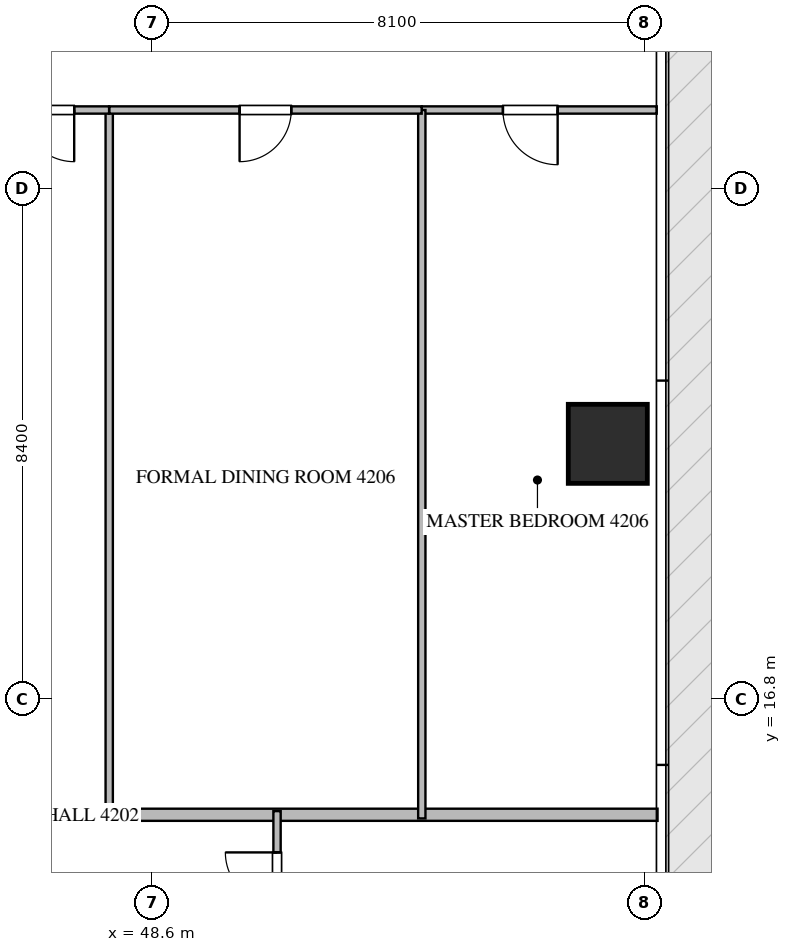
"""IFC4 building model, lengths in metres.
Left out: names, types, materials, properties, quantities, classifications, styles, units other than length and angle.
Written with IfcOpenShell. Run it as: python <this file> out.ifc"""

import sys

from ifc_helpers import new_model, si_unit, direction, frame, frame_2d, origin, origin_2d, place, context, subcontext, project, spatial, rectangle, extrude, source, transform, mapped, element, fill, save


model = new_model("IFC4")
c1 = context("Model", 3, precision=1e-05, world=origin(), true_north=direction((0.0, 1.0)))
c2 = subcontext(c1, "Body", "Model", "MODEL_VIEW")
j1 = project(units=[si_unit("LENGTHUNIT", "METRE"), si_unit("PLANEANGLEUNIT", "RADIAN")], contexts=[c1])
p1 = place(None, origin())
s1 = spatial("IfcSite", under=j1, at=p1, CompositionType="ELEMENT")
p2 = place(p1, origin())
s2 = spatial("IfcBuilding", under=s1, at=p2, CompositionType="ELEMENT")
p3 = place(p2, frame((0.0, 0.0, 168.9)))
s3 = spatial("IfcBuildingStorey", under=s2, at=p3, CompositionType="ELEMENT", Elevation=168.9)
m1 = source(origin(), c2, "Body", "SweptSolid", [
    extrude(rectangle(XDim=1.3, YDim=1.3, at=origin_2d()), origin(), (0.0, 0.0, 1.0), 3.75),
])
p4 = place(p3, frame((56.1, 21.0, -0.26), z_axis=(0.0, 0.0, 1.0), x_axis=(1.0, 0.0, 0.0)))
e1 = element("IfcColumn", 1, at=p4, inside=s3, PredefinedType="COLUMN", context=c2, shape_type="MappedRepresentation", body=[
    mapped(m1, transform((0.0, 0.0, 0.0), scale=1.0)),
])
p5 = place(p3, frame((43.85, 14.9, 0.0), z_axis=(0.0, 0.0, 1.0), x_axis=(1.0, 0.0, 0.0)))
e2 = element("IfcWall", 2, at=p5, inside=s3, PredefinedType="PARTITIONING", context=c2, shape_type="SweptSolid", body=[
    extrude(rectangle(XDim=13.068, YDim=0.2, at=frame_2d((6.534, 0.0))), origin(), (0.0, 0.0, 1.0), 3.49),
])
p6 = place(p3, frame((50.66, 12.752, 0.0), z_axis=(0.0, 0.0, 1.0), x_axis=(0.0, 1.0, 0.0)))
e3 = element("IfcWall", 3, at=p6, inside=s3, PredefinedType="PARTITIONING", context=c2, shape_type="SweptSolid", body=[
    extrude(rectangle(XDim=2.208, YDim=0.12, at=frame_2d((1.104, 0.0))), origin(), (0.0, 0.0, 1.0), 3.49),
])
p7 = place(p6, frame((0.679, 0.0, 0.0)))
e4 = element("IfcOpeningElement", 4, at=p7, cuts=e3, PredefinedType="OPENING", context=c2, shape_type="SweptSolid", body=[
    extrude(rectangle(XDim=0.85, YDim=2.1, at=frame_2d((0.425, 1.05))), frame((0.0, 0.07, 0.0), z_axis=(0.0, -1.0, 0.0), x_axis=(1.0, 0.0, 0.0)), (0.0, 0.0, 1.0), 0.14),
])
p8 = place(p3, frame((56.905, 26.49, 0.0), z_axis=(0.0, 0.0, 1.0), x_axis=(-1.0, 0.0, 0.0)))
e5 = element("IfcWall", 5, at=p8, inside=s3, PredefinedType="PARTITIONING", context=c2, shape_type="SweptSolid", body=[
    extrude(rectangle(XDim=3.864, YDim=0.12, at=frame_2d((1.932, 0.0))), origin(), (0.0, 0.0, 1.0), 3.49),
])
p9 = place(p8, frame((1.63, 0.0, 0.0)))
e6 = element("IfcOpeningElement", 6, at=p9, cuts=e5, PredefinedType="OPENING", context=c2, shape_type="SweptSolid", body=[
    extrude(rectangle(XDim=0.9, YDim=2.1, at=frame_2d((0.45, 1.05))), frame((0.0, 0.07, 0.0), z_axis=(0.0, -1.0, 0.0), x_axis=(1.0, 0.0, 0.0)), (0.0, 0.0, 1.0), 0.14),
])
p10 = place(p3, frame((53.041, 14.84, 0.0), z_axis=(0.0, 0.0, 1.0), x_axis=(0.0, 1.0, 0.0)))
e7 = element("IfcWall", 7, at=p10, inside=s3, PredefinedType="PARTITIONING", context=c2, shape_type="SweptSolid", body=[
    extrude(rectangle(XDim=11.65, YDim=0.12, at=frame_2d((5.825, 0.0))), origin(), (0.0, 0.0, 1.0), 3.49),
])
p11 = place(p3, frame((47.9, 14.84, 0.0), z_axis=(0.0, 0.0, 1.0), x_axis=(0.0, 1.0, 0.0)))
e8 = element("IfcWall", 8, at=p11, inside=s3, PredefinedType="PARTITIONING", context=c2, shape_type="SweptSolid", body=[
    extrude(rectangle(XDim=11.65, YDim=0.12, at=frame_2d((5.825, 0.0))), origin(), (0.0, 0.0, 1.0), 2.972),
])
p12 = place(p3, frame((53.039, 26.49, 0.0), z_axis=(0.0, 0.0, 1.0), x_axis=(-1.0, 0.0, 0.0)))
e9 = element("IfcWall", 9, at=p12, inside=s3, PredefinedType="PARTITIONING", context=c2, shape_type="SweptSolid", body=[
    extrude(rectangle(XDim=5.139, YDim=0.12, at=frame_2d((2.57, 0.0))), origin(), (0.0, 0.0, 1.0), 3.49),
])
p13 = place(p12, frame((2.145, 0.0, 0.0)))
e10 = element("IfcOpeningElement", 10, at=p13, cuts=e9, PredefinedType="OPENING", context=c2, shape_type="SweptSolid", body=[
    extrude(rectangle(XDim=0.85, YDim=2.1, at=frame_2d((0.425, 1.05))), frame((0.0, 0.07, 0.0), z_axis=(0.0, -1.0, 0.0), x_axis=(1.0, 0.0, 0.0)), (0.0, 0.0, 1.0), 0.14),
])
p14 = place(p3, frame((47.898, 26.49, 0.0), z_axis=(0.0, 0.0, 1.0), x_axis=(-1.0, 0.0, 0.0)))
e11 = element("IfcWall", 11, at=p14, inside=s3, PredefinedType="PARTITIONING", context=c2, shape_type="SweptSolid", body=[
    extrude(rectangle(XDim=1.998, YDim=0.12, at=frame_2d((0.999, 0.0))), origin(), (0.0, 0.0, 1.0), 3.49),
])
p15 = place(p14, frame((0.574, 0.0, 0.0)))
e12 = element("IfcOpeningElement", 12, at=p15, cuts=e11, PredefinedType="OPENING", context=c2, shape_type="SweptSolid", body=[
    extrude(rectangle(XDim=0.85, YDim=2.1, at=frame_2d((0.425, 1.05))), frame((0.0, 0.07, 0.0), z_axis=(0.0, -1.0, 0.0), x_axis=(1.0, 0.0, 0.0)), (0.0, 0.0, 1.0), 0.14),
])
m2 = source(origin(), c2, "Body", "SweptSolid", [
    extrude(rectangle(XDim=0.85, YDim=2.1, at=frame_2d((0.425, 1.05))), frame((0.0, 0.025, 0.0), z_axis=(0.0, -1.0, 0.0), x_axis=(1.0, 0.0, 0.0)), (0.0, 0.0, 1.0), 0.05),
])
p16 = place(p7, origin())
e13 = element("IfcDoor", 13, at=p16, inside=s3, OperationType="SINGLE_SWING_RIGHT", PredefinedType="DOOR", context=c2, shape_type="MappedRepresentation", body=[
    mapped(m2, transform((0.0, 0.0, 0.0), scale=1.0)),
])
fill(e4, e13)
m3 = source(origin(), c2, "Body", "SweptSolid", [
    extrude(rectangle(XDim=0.9, YDim=2.1, at=frame_2d((0.45, 1.05))), frame((0.0, 0.025, 0.0), z_axis=(0.0, -1.0, 0.0), x_axis=(1.0, 0.0, 0.0)), (0.0, 0.0, 1.0), 0.05),
])
p17 = place(p9, origin())
e14 = element("IfcDoor", 14, at=p17, inside=s3, OperationType="SINGLE_SWING_LEFT", PredefinedType="DOOR", context=c2, shape_type="MappedRepresentation", body=[
    mapped(m3, transform((0.0, 0.0, 0.0), scale=1.0)),
])
fill(e6, e14)
p18 = place(p13, origin())
e15 = element("IfcDoor", 15, at=p18, inside=s3, OperationType="SINGLE_SWING_RIGHT", PredefinedType="DOOR", context=c2, shape_type="MappedRepresentation", body=[
    mapped(m2, transform((0.0, 0.0, 0.0), scale=1.0)),
])
fill(e10, e15)
p19 = place(p15, origin())
e16 = element("IfcDoor", 16, at=p19, inside=s3, OperationType="SINGLE_SWING_LEFT", PredefinedType="DOOR", context=c2, shape_type="MappedRepresentation", body=[
    mapped(m2, transform((0.0, 0.0, 0.0), scale=1.0)),
])
fill(e12, e16)
save(model, sys.argv[1])
